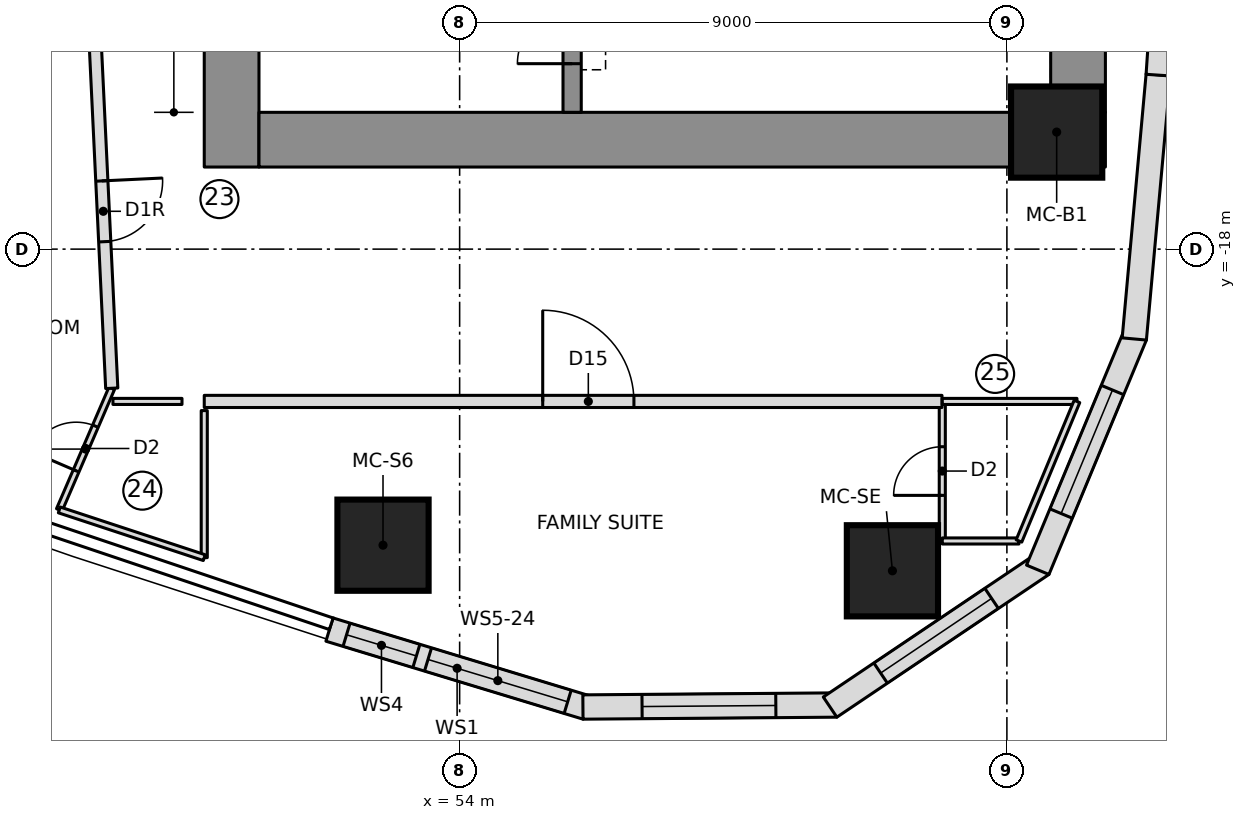
"""IFC4 building model, lengths in metres.
Left out: names, types, materials, properties, quantities, classifications, styles, units other than length and angle.
Written with IfcOpenShell. Run it as: python <this file> out.ifc"""

import sys

from ifc_helpers import new_model, si_unit, direction, frame, frame_2d, origin, origin_2d, place, context, subcontext, project, spatial, polyline, rectangle, outline, extrude, element, fill, save


model = new_model("IFC4")
c1 = context("Model", 3, precision=1e-05, world=origin(), true_north=direction((0.0, 1.0)))
c2 = subcontext(c1, "Body", "Model", "MODEL_VIEW")
j1 = project(units=[si_unit("LENGTHUNIT", "METRE"), si_unit("PLANEANGLEUNIT", "RADIAN")], contexts=[c1])
p1 = place(None, origin())
s1 = spatial("IfcSite", under=j1, at=p1, CompositionType="ELEMENT")
p2 = place(p1, origin())
s2 = spatial("IfcBuilding", under=s1, at=p2, CompositionType="ELEMENT")
p3 = place(p2, frame((0.0, 0.0, 151.5)))
s3 = spatial("IfcBuildingStorey", under=s2, at=p3, CompositionType="ELEMENT", Elevation=151.5)
p4 = place(p3, frame((50.25, -16.65, 0.0), z_axis=(0.0, 0.0, 1.0), x_axis=(0.0, 1.0, 0.0)))
e1 = element("IfcWall", 1, at=p4, inside=s3, PredefinedType="SHEAR", context=c2, shape_type="SweptSolid", body=[
    extrude(rectangle(XDim=10.0, YDim=0.9, at=frame_2d((5.0, 0.0))), origin(), (0.0, 0.0, 1.0), 3.55),
])
p5 = place(p4, frame((2.4, 0.0, 0.0)))
e2 = element("IfcOpeningElement", 2, at=p5, cuts=e1, PredefinedType="OPENING", context=c2, shape_type="SweptSolid", body=[
    extrude(rectangle(XDim=1.1, YDim=2.1, at=frame_2d((0.55, 1.05))), frame((0.0, 0.46, 0.0), z_axis=(0.0, -1.0, 0.0), x_axis=(1.0, 0.0, 0.0)), (0.0, 0.0, 1.0), 0.92),
])
p6 = place(p3, frame((50.7, -16.2, 0.0), z_axis=(0.0, 0.0, 1.0), x_axis=(1.0, 0.0, 0.0)))
e3 = element("IfcWall", 3, at=p6, inside=s3, PredefinedType="SHEAR", context=c2, shape_type="SweptSolid", body=[
    extrude(rectangle(XDim=13.92, YDim=0.9, at=frame_2d((6.96, 0.0))), origin(), (0.0, 0.0, 1.0), 3.55),
])
p7 = place(p3, frame((64.17, -15.75, 0.0), z_axis=(0.0, 0.0, 1.0), x_axis=(0.0, 1.0, 0.0)))
e4 = element("IfcWall", 4, at=p7, inside=s3, PredefinedType="SHEAR", context=c2, shape_type="SweptSolid", body=[
    extrude(rectangle(XDim=7.005, YDim=0.9, at=frame_2d((3.503, 0.0))), origin(), (0.0, 0.0, 1.0), 3.55),
])
p8 = place(p3, frame((55.85, -15.75, 0.0), z_axis=(0.0, 0.0, 1.0), x_axis=(0.0, 1.0, 0.0)))
e5 = element("IfcWall", 5, at=p8, inside=s3, PredefinedType="SHEAR", context=c2, shape_type="SweptSolid", body=[
    extrude(rectangle(XDim=5.4, YDim=0.3, at=frame_2d((2.7, 0.0))), origin(), (0.0, 0.0, 1.0), 3.55),
])
p9 = place(p8, frame((3.6, 0.0, 0.0)))
e6 = element("IfcOpeningElement", 6, at=p9, cuts=e5, PredefinedType="OPENING", context=c2, shape_type="SweptSolid", body=[
    extrude(rectangle(XDim=1.1, YDim=2.1, at=frame_2d((0.55, 1.05))), frame((0.0, 0.16, 0.0), z_axis=(0.0, -1.0, 0.0), x_axis=(1.0, 0.0, 0.0)), (0.0, 0.0, 1.0), 0.32),
])
p10 = place(p8, frame((0.8, 0.0, 0.0)))
e7 = element("IfcOpeningElement", 7, at=p10, cuts=e5, PredefinedType="OPENING", context=c2, shape_type="SweptSolid", body=[
    extrude(rectangle(XDim=0.9, YDim=2.1, at=frame_2d((0.45, 1.05))), frame((0.0, 0.16, 0.0), z_axis=(0.0, -1.0, 0.0), x_axis=(1.0, 0.0, 0.0)), (0.0, 0.0, 1.0), 0.32),
])
for number, where, z_axis, x_axis in (
    (8, (52.74, -22.869, 0.0), (0.0, 0.0, 1.0), (1.0, 0.0, 0.0)),
    (9, (61.117, -23.291, 0.0), (0.0, 0.0, 1.0), (1.0, 0.0, 0.0)),
    (10, (63.819, -16.075, 0.0), (0.0, 0.0, 1.0), (1.0, 0.0, 0.0)),
):
    element("IfcColumn", number, at=place(p3, frame(where, z_axis=z_axis, x_axis=x_axis)), inside=s3, PredefinedType="COLUMN", context=c2, shape_type="SweptSolid", body=[
        extrude(rectangle(XDim=1.5, YDim=1.5, at=origin_2d()), origin(), (0.0, 0.0, 1.0), 3.55),
    ])
p11 = place(p3, frame((51.859, -24.257, 0.0), z_axis=(0.0, 0.0, 1.0), x_axis=(0.956964488344, -0.290205044837, 0.0)))
e11 = element("IfcWall", 11, at=p11, inside=s3, PredefinedType="NOTDEFINED", context=c2, shape_type="SweptSolid", body=[
    extrude(outline(polyline([(0.0, -0.2), (4.418, -0.2), (4.357, 0.2), (0.0, 0.2), (0.0, -0.2)])), origin(), (0.0, 0.0, 1.0), 3.25),
])
p12 = place(p11, frame((0.294, 0.0, 0.9)))
e12 = element("IfcOpeningElement", 12, at=p12, cuts=e11, PredefinedType="OPENING", context=c2, shape_type="SweptSolid", body=[
    extrude(rectangle(XDim=1.2, YDim=1.8, at=frame_2d((0.6, 0.9))), frame((0.0, 0.21, 0.0), z_axis=(0.0, -1.0, 0.0), x_axis=(1.0, 0.0, 0.0)), (0.0, 0.0, 1.0), 0.42),
])
p13 = place(p11, frame((1.694, 0.0, 0.9)))
e13 = element("IfcOpeningElement", 13, at=p13, cuts=e11, PredefinedType="OPENING", context=c2, shape_type="SweptSolid", body=[
    extrude(rectangle(XDim=2.4, YDim=1.8, at=frame_2d((1.2, 0.9))), frame((0.0, 0.21, 0.0), z_axis=(0.0, -1.0, 0.0), x_axis=(1.0, 0.0, 0.0)), (0.0, 0.0, 1.0), 0.42),
])
p14 = place(p3, frame((56.058, -25.531, 0.0), z_axis=(0.0, 0.0, 1.0), x_axis=(0.99996933771, 0.007830941131, 0.0)))
e14 = element("IfcWall", 14, at=p14, inside=s3, PredefinedType="NOTDEFINED", context=c2, shape_type="SweptSolid", body=[
    extrude(outline(polyline([(-0.031, -0.2), (4.145, -0.2), (4.024, 0.2), (0.031, 0.2), (-0.031, -0.2)])), origin(), (0.0, 0.0, 1.0), 3.25),
])
p15 = place(p14, frame((0.942, 0.0, 0.6)))
e15 = element("IfcOpeningElement", 15, at=p15, cuts=e14, PredefinedType="OPENING", context=c2, shape_type="SweptSolid", body=[
    extrude(outline(polyline([(0.0, 1.35), (0.084, 1.771), (0.322, 2.128), (0.679, 2.366), (1.1, 2.45), (1.521, 2.366), (1.878, 2.128), (2.116, 1.771), (2.2, 1.35), (2.2, 1.1), (2.116, 0.679), (1.878, 0.322), (1.521, 0.084), (1.1, 0.0), (0.679, 0.084), (0.322, 0.322), (0.084, 0.679), (0.0, 1.1), (0.0, 1.35)])), frame((0.0, 0.21, 0.0), z_axis=(0.0, -1.0, 0.0), x_axis=(1.0, 0.0, 0.0)), (0.0, 0.0, 1.0), 0.42),
])
p16 = place(p3, frame((60.142, -25.499, 0.0), z_axis=(0.0, 0.0, 1.0), x_axis=(0.829642062482, 0.558295663749, 0.0)))
e16 = element("IfcWall", 16, at=p16, inside=s3, PredefinedType="NOTDEFINED", context=c2, shape_type="SweptSolid", body=[
    extrude(outline(polyline([(-0.06, -0.2), (4.144, -0.2), (4.024, 0.2), (0.06, 0.2), (-0.06, -0.2)])), origin(), (0.0, 0.0, 1.0), 3.25),
])
p17 = place(p16, frame((0.942, 0.0, 0.6)))
e17 = element("IfcOpeningElement", 17, at=p17, cuts=e16, PredefinedType="OPENING", context=c2, shape_type="SweptSolid", body=[
    extrude(outline(polyline([(0.0, 1.35), (0.084, 1.771), (0.322, 2.128), (0.679, 2.366), (1.1, 2.45), (1.521, 2.366), (1.878, 2.128), (2.116, 1.771), (2.2, 1.35), (2.2, 1.1), (2.116, 0.679), (1.878, 0.322), (1.521, 0.084), (1.1, 0.0), (0.679, 0.084), (0.322, 0.322), (0.084, 0.679), (0.0, 1.1), (0.0, 1.35)])), frame((0.0, 0.21, 0.0), z_axis=(0.0, -1.0, 0.0), x_axis=(1.0, 0.0, 0.0)), (0.0, 0.0, 1.0), 0.42),
])
p18 = place(p3, frame((63.53, -23.219, 0.0), z_axis=(0.0, 0.0, 1.0), x_axis=(0.383817293519, 0.923409056267, 0.0)))
e18 = element("IfcWall", 18, at=p18, inside=s3, PredefinedType="NOTDEFINED", context=c2, shape_type="SweptSolid", body=[
    extrude(outline(polyline([(-0.06, -0.2), (4.115, -0.2), (4.054, 0.2), (0.06, 0.2), (-0.06, -0.2)])), origin(), (0.0, 0.0, 1.0), 3.25),
])
p19 = place(p18, frame((0.942, 0.0, 0.6)))
e19 = element("IfcOpeningElement", 19, at=p19, cuts=e18, PredefinedType="OPENING", context=c2, shape_type="SweptSolid", body=[
    extrude(outline(polyline([(0.0, 1.35), (0.084, 1.771), (0.322, 2.128), (0.679, 2.366), (1.1, 2.45), (1.521, 2.366), (1.878, 2.128), (2.116, 1.771), (2.2, 1.35), (2.2, 1.1), (2.116, 0.679), (1.878, 0.322), (1.521, 0.084), (1.1, 0.0), (0.679, 0.084), (0.322, 0.322), (0.084, 0.679), (0.0, 1.1), (0.0, 1.35)])), frame((0.0, 0.21, 0.0), z_axis=(0.0, -1.0, 0.0), x_axis=(1.0, 0.0, 0.0)), (0.0, 0.0, 1.0), 0.42),
])
p20 = place(p3, frame((65.098, -19.447, 0.0), z_axis=(0.0, 0.0, 1.0), x_axis=(0.090296735989, 0.995914905737, 0.0)))
e20 = element("IfcWall", 20, at=p20, inside=s3, PredefinedType="NOTDEFINED", context=c2, shape_type="SweptSolid", body=[
    extrude(outline(polyline([(-0.031, -0.2), (4.331, -0.2), (4.326, 0.2), (0.031, 0.2), (-0.031, -0.2)])), origin(), (0.0, 0.0, 1.0), 3.25),
])
p21 = place(p3, frame((65.489, -15.136, 0.0), z_axis=(0.0, 0.0, 1.0), x_axis=(0.067731727279, 0.997703569764, 0.0)))
e21 = element("IfcWall", 21, at=p21, inside=s3, PredefinedType="NOTDEFINED", context=c2, shape_type="SweptSolid", body=[
    extrude(outline(polyline([(-0.002, -0.2), (4.331, -0.2), (4.327, 0.2), (0.002, 0.2), (-0.002, -0.2)])), origin(), (0.0, 0.0, 1.0), 3.25),
])
p22 = place(p3, frame((61.938, -22.8, 0.0), z_axis=(0.0, 0.0, 1.0), x_axis=(0.0, 1.0, 0.0)))
e22 = element("IfcWall", 22, at=p22, inside=s3, PredefinedType="PARTITIONING", context=c2, shape_type="SweptSolid", body=[
    extrude(rectangle(XDim=2.3, YDim=0.1, at=frame_2d((1.15, 0.0))), origin(), (0.0, 0.0, 1.0), 3.25),
])
p23 = place(p22, frame((0.75, 0.0, 0.0)))
e23 = element("IfcOpeningElement", 23, at=p23, cuts=e22, PredefinedType="OPENING", context=c2, shape_type="SweptSolid", body=[
    extrude(rectangle(XDim=0.8, YDim=2.1, at=frame_2d((0.4, 1.05))), frame((0.0, 0.06, 0.0), z_axis=(0.0, -1.0, 0.0), x_axis=(1.0, 0.0, 0.0)), (0.0, 0.0, 1.0), 0.12),
])
p24 = place(p3, frame((63.198, -22.8, 0.0), z_axis=(0.0, 0.0, 1.0), x_axis=(-1.0, 0.0, 0.0)))
e24 = element("IfcWall", 24, at=p24, inside=s3, PredefinedType="PARTITIONING", context=c2, shape_type="SweptSolid", body=[
    extrude(rectangle(XDim=1.261, YDim=0.1, at=frame_2d((0.63, 0.0))), origin(), (0.0, 0.0, 1.0), 3.25),
])
p25 = place(p3, frame((44.202, -21.172, 0.0), z_axis=(0.0, 0.0, 1.0), x_axis=(0.39600636385, 0.918247766014, 0.0)))
e25 = element("IfcWall", 25, at=p25, inside=s3, PredefinedType="PARTITIONING", context=c2, shape_type="SweptSolid", body=[
    extrude(rectangle(XDim=7.62, YDim=0.2, at=frame_2d((3.81, 0.0))), origin(), (0.0, 0.0, 1.0), 3.25),
])
p26 = place(p3, frame((47.416, -22.289, 0.0), z_axis=(0.0, 0.0, 1.0), x_axis=(0.396028123143, 0.918238381729, 0.0)))
e26 = element("IfcWall", 26, at=p26, inside=s3, PredefinedType="PARTITIONING", context=c2, shape_type="SweptSolid", body=[
    extrude(rectangle(XDim=2.179, YDim=0.1, at=frame_2d((1.089, 0.0))), origin(), (0.0, 0.0, 1.0), 3.25),
])
p27 = place(p26, frame((0.7, 0.0, 0.0)))
e27 = element("IfcOpeningElement", 27, at=p27, cuts=e26, PredefinedType="OPENING", context=c2, shape_type="SweptSolid", body=[
    extrude(rectangle(XDim=0.8, YDim=2.1, at=frame_2d((0.4, 1.05))), frame((0.0, 0.06, 0.0), z_axis=(0.0, -1.0, 0.0), x_axis=(1.0, 0.0, 0.0)), (0.0, 0.0, 1.0), 0.12),
])
p28 = place(p3, frame((49.8, -20.505, 0.0), z_axis=(0.0, 0.0, 1.0), x_axis=(1.0, 0.0, 0.0)))
e28 = element("IfcWall", 28, at=p28, inside=s3, PredefinedType="PARTITIONING", context=c2, shape_type="SweptSolid", body=[
    extrude(rectangle(XDim=12.133, YDim=0.2, at=frame_2d((6.066, 0.0))), origin(), (0.0, 0.0, 1.0), 3.25),
])
p29 = place(p28, frame((5.566, 0.0, 0.0)))
e29 = element("IfcOpeningElement", 29, at=p29, cuts=e28, PredefinedType="OPENING", context=c2, shape_type="SweptSolid", body=[
    extrude(rectangle(XDim=1.5, YDim=2.1, at=frame_2d((0.75, 1.05))), frame((0.0, 0.11, 0.0), z_axis=(0.0, -1.0, 0.0), x_axis=(1.0, 0.0, 0.0)), (0.0, 0.0, 1.0), 0.22),
])
p30 = place(p3, frame((61.938, -20.505, 0.0), z_axis=(0.0, 0.0, 1.0), x_axis=(1.0, 0.0, 0.0)))
e30 = element("IfcWall", 30, at=p30, inside=s3, PredefinedType="PARTITIONING", context=c2, shape_type="SweptSolid", body=[
    extrude(rectangle(XDim=2.215, YDim=0.1, at=frame_2d((1.107, 0.0))), origin(), (0.0, 0.0, 1.0), 3.25),
])
p31 = place(p3, frame((64.152, -20.505, 0.0), z_axis=(0.0, 0.0, 1.0), x_axis=(-0.383855043906, -0.923393364319, 0.0)))
e31 = element("IfcWall", 31, at=p31, inside=s3, PredefinedType="PARTITIONING", context=c2, shape_type="SweptSolid", body=[
    extrude(rectangle(XDim=2.486, YDim=0.1, at=frame_2d((1.243, 0.0))), origin(), (0.0, 0.0, 1.0), 3.25),
])
p32 = place(p3, frame((48.299, -20.505, 0.0), z_axis=(0.0, 0.0, 1.0), x_axis=(1.0, 0.0, 0.0)))
e32 = element("IfcWall", 32, at=p32, inside=s3, PredefinedType="PARTITIONING", context=c2, shape_type="SweptSolid", body=[
    extrude(rectangle(XDim=1.135, YDim=0.1, at=frame_2d((0.568, 0.0))), origin(), (0.0, 0.0, 1.0), 3.25),
])
p33 = place(p3, frame((49.8, -20.656, 0.0), z_axis=(0.0, 0.0, 1.0), x_axis=(0.0, -1.0, 0.0)))
e33 = element("IfcWall", 33, at=p33, inside=s3, PredefinedType="PARTITIONING", context=c2, shape_type="SweptSolid", body=[
    extrude(rectangle(XDim=2.418, YDim=0.1, at=frame_2d((1.209, 0.0))), origin(), (0.0, 0.0, 1.0), 3.25),
])
p34 = place(p3, frame((49.8, -23.074, 0.0), z_axis=(0.0, 0.0, 1.0), x_axis=(-0.949844078437, 0.312723882455, 0.0)))
e34 = element("IfcWall", 34, at=p34, inside=s3, PredefinedType="PARTITIONING", context=c2, shape_type="SweptSolid", body=[
    extrude(rectangle(XDim=2.51, YDim=0.1, at=frame_2d((1.255, 0.0))), origin(), (0.0, 0.0, 1.0), 3.25),
])
p35 = place(p3, frame((48.0, -14.467, 0.0), z_axis=(0.0, 0.0, 1.0), x_axis=(0.047837808481, -0.998855116661, 0.0)))
e35 = element("IfcWall", 35, at=p35, inside=s3, PredefinedType="PARTITIONING", context=c2, shape_type="SweptSolid", body=[
    extrude(rectangle(XDim=5.828, YDim=0.2, at=frame_2d((2.914, 0.0))), origin(), (0.0, 0.0, 1.0), 3.25),
])
p36 = place(p35, frame((2.414, 0.0, 0.0)))
e36 = element("IfcOpeningElement", 36, at=p36, cuts=e35, PredefinedType="OPENING", context=c2, shape_type="SweptSolid", body=[
    extrude(rectangle(XDim=1.0, YDim=2.1, at=frame_2d((0.5, 1.05))), frame((0.0, 0.11, 0.0), z_axis=(0.0, -1.0, 0.0), x_axis=(1.0, 0.0, 0.0)), (0.0, 0.0, 1.0), 0.22),
])
p37 = place(p12, origin())
e37 = element("IfcWindow", 37, at=p37, inside=s3, PartitioningType="SINGLE_PANEL", PredefinedType="WINDOW", context=c2, shape_type="SweptSolid", body=[
    extrude(rectangle(XDim=1.2, YDim=1.8, at=frame_2d((0.6, 0.9))), frame((0.0, 0.17, 0.0), z_axis=(0.0, -1.0, 0.0), x_axis=(1.0, 0.0, 0.0)), (0.0, 0.0, 1.0), 0.06),
])
fill(e12, e37)
p38 = place(p13, origin())
e38 = element("IfcWindow", 38, at=p38, inside=s3, PartitioningType="SINGLE_PANEL", PredefinedType="WINDOW", context=c2, shape_type="SweptSolid", body=[
    extrude(rectangle(XDim=2.4, YDim=1.8, at=frame_2d((1.2, 0.9))), frame((0.0, 0.17, 0.0), z_axis=(0.0, -1.0, 0.0), x_axis=(1.0, 0.0, 0.0)), (0.0, 0.0, 1.0), 0.06),
])
fill(e13, e38)
p39 = place(p15, origin())
e39 = element("IfcWindow", 39, at=p39, inside=s3, PartitioningType="SINGLE_PANEL", PredefinedType="WINDOW", context=c2, shape_type="SweptSolid", body=[
    extrude(outline(polyline([(0.0, 1.35), (0.084, 1.771), (0.322, 2.128), (0.679, 2.366), (1.1, 2.45), (1.521, 2.366), (1.878, 2.128), (2.116, 1.771), (2.2, 1.35), (2.2, 1.1), (2.116, 0.679), (1.878, 0.322), (1.521, 0.084), (1.1, 0.0), (0.679, 0.084), (0.322, 0.322), (0.084, 0.679), (0.0, 1.1), (0.0, 1.35)])), frame((0.0, 0.17, 0.0), z_axis=(0.0, -1.0, 0.0), x_axis=(1.0, 0.0, 0.0)), (0.0, 0.0, 1.0), 0.06),
])
fill(e15, e39)
p40 = place(p17, origin())
e40 = element("IfcWindow", 40, at=p40, inside=s3, PartitioningType="SINGLE_PANEL", PredefinedType="WINDOW", context=c2, shape_type="SweptSolid", body=[
    extrude(outline(polyline([(0.0, 1.35), (0.084, 1.771), (0.322, 2.128), (0.679, 2.366), (1.1, 2.45), (1.521, 2.366), (1.878, 2.128), (2.116, 1.771), (2.2, 1.35), (2.2, 1.1), (2.116, 0.679), (1.878, 0.322), (1.521, 0.084), (1.1, 0.0), (0.679, 0.084), (0.322, 0.322), (0.084, 0.679), (0.0, 1.1), (0.0, 1.35)])), frame((0.0, 0.17, 0.0), z_axis=(0.0, -1.0, 0.0), x_axis=(1.0, 0.0, 0.0)), (0.0, 0.0, 1.0), 0.06),
])
fill(e17, e40)
p41 = place(p19, origin())
e41 = element("IfcWindow", 41, at=p41, inside=s3, PartitioningType="SINGLE_PANEL", PredefinedType="WINDOW", context=c2, shape_type="SweptSolid", body=[
    extrude(outline(polyline([(0.0, 1.35), (0.084, 1.771), (0.322, 2.128), (0.679, 2.366), (1.1, 2.45), (1.521, 2.366), (1.878, 2.128), (2.116, 1.771), (2.2, 1.35), (2.2, 1.1), (2.116, 0.679), (1.878, 0.322), (1.521, 0.084), (1.1, 0.0), (0.679, 0.084), (0.322, 0.322), (0.084, 0.679), (0.0, 1.1), (0.0, 1.35)])), frame((0.0, 0.17, 0.0), z_axis=(0.0, -1.0, 0.0), x_axis=(1.0, 0.0, 0.0)), (0.0, 0.0, 1.0), 0.06),
])
fill(e19, e41)
p42 = place(p23, origin())
e42 = element("IfcDoor", 42, at=p42, inside=s3, OperationType="SINGLE_SWING_LEFT", PredefinedType="DOOR", context=c2, shape_type="SweptSolid", body=[
    extrude(rectangle(XDim=0.8, YDim=2.1, at=frame_2d((0.4, 1.05))), frame((0.0, 0.025, 0.0), z_axis=(0.0, -1.0, 0.0), x_axis=(1.0, 0.0, 0.0)), (0.0, 0.0, 1.0), 0.05),
])
fill(e23, e42)
p43 = place(p27, origin())
e43 = element("IfcDoor", 43, at=p43, inside=s3, OperationType="SINGLE_SWING_LEFT", PredefinedType="DOOR", context=c2, shape_type="SweptSolid", body=[
    extrude(rectangle(XDim=0.8, YDim=2.1, at=frame_2d((0.4, 1.05))), frame((0.0, 0.025, 0.0), z_axis=(0.0, -1.0, 0.0), x_axis=(1.0, 0.0, 0.0)), (0.0, 0.0, 1.0), 0.05),
])
fill(e27, e43)
p44 = place(p29, origin())
e44 = element("IfcDoor", 44, at=p44, inside=s3, OperationType="DOUBLE_DOOR_SINGLE_SWING", PredefinedType="DOOR", context=c2, shape_type="SweptSolid", body=[
    extrude(rectangle(XDim=1.5, YDim=2.1, at=frame_2d((0.75, 1.05))), frame((0.0, 0.025, 0.0), z_axis=(0.0, -1.0, 0.0), x_axis=(1.0, 0.0, 0.0)), (0.0, 0.0, 1.0), 0.05),
])
fill(e29, e44)
p45 = place(p36, origin())
e45 = element("IfcDoor", 45, at=p45, inside=s3, OperationType="SINGLE_SWING_RIGHT", PredefinedType="DOOR", context=c2, shape_type="SweptSolid", body=[
    extrude(rectangle(XDim=1.0, YDim=2.1, at=frame_2d((0.5, 1.05))), frame((0.0, 0.025, 0.0), z_axis=(0.0, -1.0, 0.0), x_axis=(1.0, 0.0, 0.0)), (0.0, 0.0, 1.0), 0.05),
])
fill(e36, e45)
p46 = place(p10, origin())
e46 = element("IfcDoor", 46, at=p46, inside=s3, OperationType="SINGLE_SWING_LEFT", PredefinedType="DOOR", context=c2, shape_type="SweptSolid", body=[
    extrude(rectangle(XDim=0.9, YDim=2.1, at=frame_2d((0.45, 1.05))), frame((0.0, 0.025, 0.0), z_axis=(0.0, -1.0, 0.0), x_axis=(1.0, 0.0, 0.0)), (0.0, 0.0, 1.0), 0.05),
])
fill(e7, e46)
save(model, sys.argv[1])
